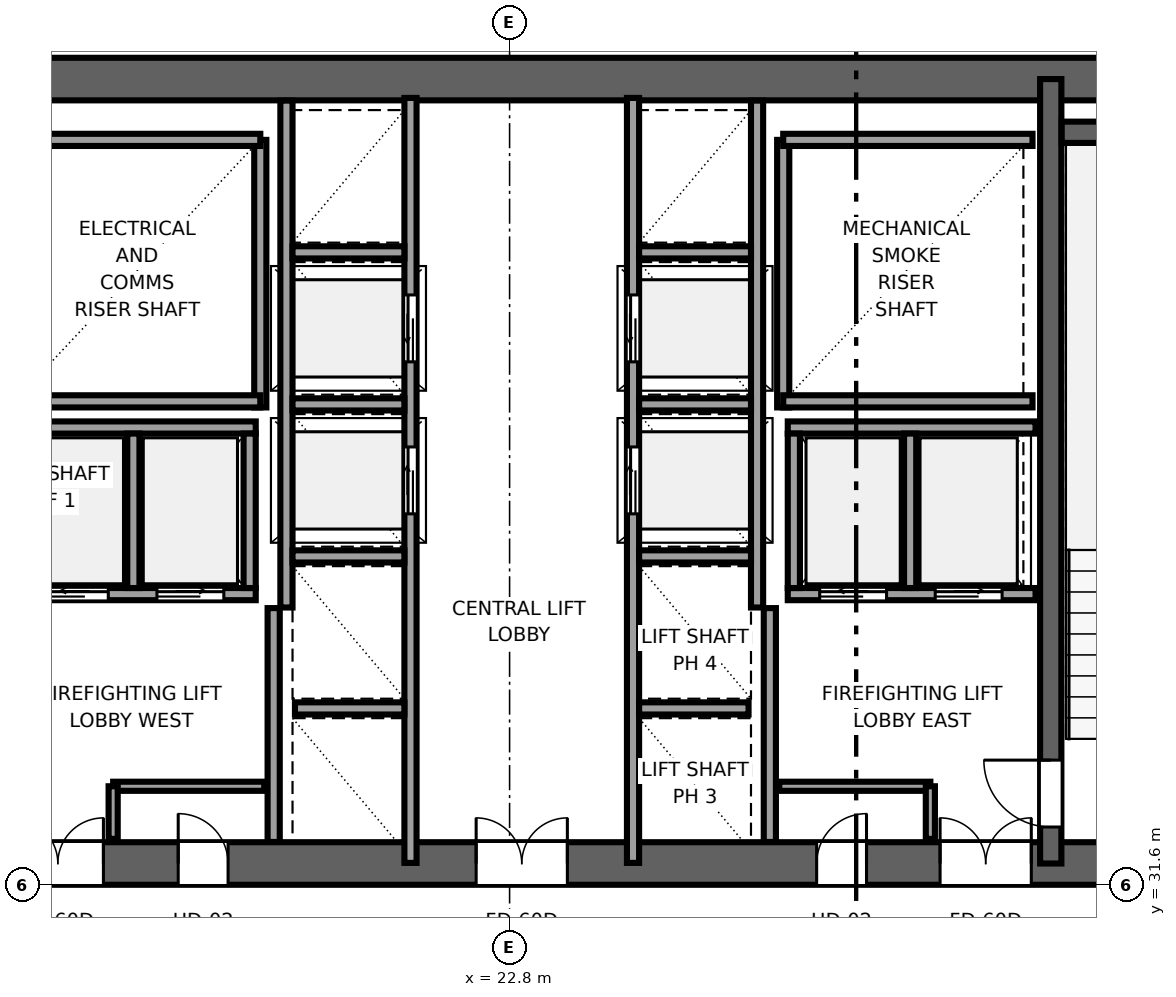
"""IFC4 building model, lengths in metres.
Left out: names, types, materials, properties, quantities, classifications, styles, units other than length and angle.
Written with IfcOpenShell. Run it as: python <this file> out.ifc"""

import sys

from ifc_helpers import new_model, si_unit, direction, frame, frame_2d, origin, place, context, subcontext, project, spatial, rectangle, extrude, source, transform, mapped, element, fill, save


model = new_model("IFC4")
c1 = context("Model", 3, precision=1e-05, world=origin(), true_north=direction((0.0, 1.0)))
c2 = subcontext(c1, "Body", "Model", "MODEL_VIEW")
j1 = project(units=[si_unit("LENGTHUNIT", "METRE"), si_unit("PLANEANGLEUNIT", "RADIAN")], contexts=[c1])
p1 = place(None, origin())
s1 = spatial("IfcSite", under=j1, at=p1, CompositionType="ELEMENT")
p2 = place(p1, origin())
s2 = spatial("IfcBuilding", under=s1, at=p2, CompositionType="ELEMENT")
p3 = place(p2, frame((0.0, 0.0, 157.7)))
s3 = spatial("IfcBuildingStorey", under=s2, at=p3, CompositionType="ELEMENT", Elevation=157.7)
p4 = place(p3, frame((9.8, 31.95, 0.0), z_axis=(0.0, 0.0, 1.0), x_axis=(1.0, 0.0, 0.0)))
e1 = element("IfcWall", 1, at=p4, inside=s3, PredefinedType="SHEAR", context=c2, shape_type="SweptSolid", body=[
    extrude(rectangle(XDim=26.4, YDim=0.7, at=frame_2d((13.2, 0.0))), origin(), (0.0, 0.0, 1.0), 3.55),
])
p5 = place(p4, frame((6.32, 0.0, 0.0), z_axis=(0.0, 0.0, 1.0), x_axis=(-1.0, 0.0, 0.0)))
e2 = element("IfcOpeningElement", 2, at=p5, cuts=e1, PredefinedType="OPENING", context=c2, shape_type="SweptSolid", body=[
    extrude(rectangle(XDim=1.5, YDim=2.04, at=frame_2d((0.75, 1.02))), frame((0.0, 0.36, 0.0), z_axis=(0.0, -1.0, 0.0), x_axis=(1.0, 0.0, 0.0)), (0.0, 0.0, 1.0), 0.72),
])
p6 = place(p4, frame((13.95, 0.0, 0.0), z_axis=(0.0, 0.0, 1.0), x_axis=(-1.0, 0.0, 0.0)))
e3 = element("IfcOpeningElement", 3, at=p6, cuts=e1, PredefinedType="OPENING", context=c2, shape_type="SweptSolid", body=[
    extrude(rectangle(XDim=1.5, YDim=2.04, at=frame_2d((0.75, 1.02))), frame((0.0, 0.36, 0.0), z_axis=(0.0, -1.0, 0.0), x_axis=(1.0, 0.0, 0.0)), (0.0, 0.0, 1.0), 0.72),
])
p7 = place(p4, frame((21.58, 0.0, 0.0), z_axis=(0.0, 0.0, 1.0), x_axis=(-1.0, 0.0, 0.0)))
e4 = element("IfcOpeningElement", 4, at=p7, cuts=e1, PredefinedType="OPENING", context=c2, shape_type="SweptSolid", body=[
    extrude(rectangle(XDim=1.5, YDim=2.04, at=frame_2d((0.75, 1.02))), frame((0.0, 0.36, 0.0), z_axis=(0.0, -1.0, 0.0), x_axis=(1.0, 0.0, 0.0)), (0.0, 0.0, 1.0), 0.72),
])
p8 = place(p4, frame((8.37, 0.0, 0.0), z_axis=(0.0, 0.0, 1.0), x_axis=(-1.0, 0.0, 0.0)))
e5 = element("IfcOpeningElement", 5, at=p8, cuts=e1, PredefinedType="OPENING", context=c2, shape_type="SweptSolid", body=[
    extrude(rectangle(XDim=0.82, YDim=2.01, at=frame_2d((0.41, 1.005))), frame((0.0, 0.36, 0.0), z_axis=(0.0, -1.0, 0.0), x_axis=(1.0, 0.0, 0.0)), (0.0, 0.0, 1.0), 0.72),
])
p9 = place(p4, frame((18.87, 0.0, 0.0), z_axis=(0.0, 0.0, 1.0), x_axis=(-1.0, 0.0, 0.0)))
e6 = element("IfcOpeningElement", 6, at=p9, cuts=e1, PredefinedType="OPENING", context=c2, shape_type="SweptSolid", body=[
    extrude(rectangle(XDim=0.82, YDim=2.01, at=frame_2d((0.41, 1.005))), frame((0.0, 0.36, 0.0), z_axis=(0.0, -1.0, 0.0), x_axis=(1.0, 0.0, 0.0)), (0.0, 0.0, 1.0), 0.72),
])
p10 = place(p3, frame((9.8, 44.85, 0.0), z_axis=(0.0, 0.0, 1.0), x_axis=(1.0, 0.0, 0.0)))
e7 = element("IfcWall", 7, at=p10, inside=s3, PredefinedType="SHEAR", context=c2, shape_type="SweptSolid", body=[
    extrude(rectangle(XDim=26.4, YDim=0.7, at=frame_2d((13.2, 0.0))), origin(), (0.0, 0.0, 1.0), 3.55),
])
p11 = place(p3, frame((31.7, 31.95, 0.0), z_axis=(0.0, 0.0, 1.0), x_axis=(0.0, 1.0, 0.0)))
e8 = element("IfcWall", 8, at=p11, inside=s3, PredefinedType="SHEAR", context=c2, shape_type="SweptSolid", body=[
    extrude(rectangle(XDim=12.9, YDim=0.35, at=frame_2d((6.45, 0.0))), origin(), (0.0, 0.0, 1.0), 3.55),
])
p12 = place(p11, frame((1.7, 0.0, 0.0), z_axis=(0.0, 0.0, 1.0), x_axis=(-1.0, 0.0, 0.0)))
e9 = element("IfcOpeningElement", 9, at=p12, cuts=e8, PredefinedType="OPENING", context=c2, shape_type="SweptSolid", body=[
    extrude(rectangle(XDim=1.1, YDim=2.12, at=frame_2d((0.55, 1.06))), frame((0.0, 0.185, 0.0), z_axis=(0.0, -1.0, 0.0), x_axis=(1.0, 0.0, 0.0)), (0.0, 0.0, 1.0), 0.37),
])
p13 = place(p3, frame((31.88, 43.975, 0.0), z_axis=(0.0, 0.0, 1.0), x_axis=(1.0, 0.0, 0.0)))
e10 = element("IfcWall", 10, at=p13, inside=s3, PredefinedType="SHEAR", context=c2, shape_type="SweptSolid", body=[
    extrude(rectangle(XDim=3.6, YDim=0.35, at=frame_2d((1.8, 0.0))), origin(), (0.0, 0.0, 1.0), 3.55),
])
p14 = place(p3, frame((18.7, 39.45, 0.0), z_axis=(0.0, 0.0, 1.0), x_axis=(0.0, 1.0, 0.0)))
e11 = element("IfcWall", 11, at=p14, inside=s3, PredefinedType="SOLIDWALL", context=c2, shape_type="SweptSolid", body=[
    extrude(rectangle(XDim=4.4, YDim=0.2, at=frame_2d((2.2, 0.0))), origin(), (0.0, 0.0, 1.0), 3.37),
])
for number, where, z_axis, x_axis in (
    (12, (14.6, 39.55, 0.0), (0.0, 0.0, 1.0), (1.0, 0.0, 0.0)),
    (13, (14.6, 43.85, 0.0), (0.0, 0.0, 1.0), (1.0, 0.0, 0.0)),
):
    element("IfcWall", number, at=place(p3, frame(where, z_axis=z_axis, x_axis=x_axis)), inside=s3, PredefinedType="SOLIDWALL", context=c2, shape_type="SweptSolid", body=[
        extrude(rectangle(XDim=4.1, YDim=0.2, at=frame_2d((2.05, 0.0))), origin(), (0.0, 0.0, 1.0), 3.37),
    ])
p15 = place(p3, frame((27.3, 39.45, 0.0), z_axis=(0.0, 0.0, 1.0), x_axis=(0.0, 1.0, 0.0)))
e14 = element("IfcWall", 14, at=p15, inside=s3, PredefinedType="SOLIDWALL", context=c2, shape_type="SweptSolid", body=[
    extrude(rectangle(XDim=4.4, YDim=0.2, at=frame_2d((2.2, 0.0))), origin(), (0.0, 0.0, 1.0), 3.37),
])
for number, where, z_axis, x_axis in (
    (15, (27.3, 39.55, 0.0), (0.0, 0.0, 1.0), (1.0, 0.0, 0.0)),
    (16, (27.3, 43.85, 0.0), (0.0, 0.0, 1.0), (1.0, 0.0, 0.0)),
):
    element("IfcWall", number, at=place(p3, frame(where, z_axis=z_axis, x_axis=x_axis)), inside=s3, PredefinedType="SOLIDWALL", context=c2, shape_type="SweptSolid", body=[
        extrude(rectangle(XDim=4.1, YDim=0.2, at=frame_2d((2.05, 0.0))), origin(), (0.0, 0.0, 1.0), 3.37),
    ])
for number, where, z_axis, x_axis in (
    (17, (18.92, 32.304, 0.0), (0.0, 0.0, 1.0), (0.0, 1.0, 0.0)),
    (18, (27.08, 32.304, 0.0), (0.0, 0.0, 1.0), (0.0, 1.0, 0.0)),
):
    element("IfcWall", number, at=place(p3, frame(where, z_axis=z_axis, x_axis=x_axis)), inside=s3, PredefinedType="SOLIDWALL", context=c2, shape_type="SweptSolid", body=[
        extrude(rectangle(XDim=3.846, YDim=0.2, at=frame_2d((1.923, 0.0))), origin(), (0.0, 0.0, 1.0), 3.37),
    ])
p16 = place(p3, frame((21.17, 31.96, 0.0), z_axis=(0.0, 0.0, 1.0), x_axis=(0.0, 1.0, 0.0)))
e19 = element("IfcWall", 19, at=p16, inside=s3, PredefinedType="SOLIDWALL", context=c2, shape_type="SweptSolid", body=[
    extrude(rectangle(XDim=12.58, YDim=0.2, at=frame_2d((6.29, 0.0))), origin(), (0.0, 0.0, 1.0), 3.37),
])
p17 = place(p16, frame((5.74, 0.0, 0.0)))
e20 = element("IfcOpeningElement", 20, at=p17, cuts=e19, PredefinedType="OPENING", context=c2, shape_type="SweptSolid", body=[
    extrude(rectangle(XDim=1.1, YDim=2.12, at=frame_2d((0.55, 1.06))), frame((0.0, 0.11, 0.0), z_axis=(0.0, -1.0, 0.0), x_axis=(1.0, 0.0, 0.0)), (0.0, 0.0, 1.0), 0.22),
])
p18 = place(p16, frame((8.24, 0.0, 0.0)))
e21 = element("IfcOpeningElement", 21, at=p18, cuts=e19, PredefinedType="OPENING", context=c2, shape_type="SweptSolid", body=[
    extrude(rectangle(XDim=1.1, YDim=2.12, at=frame_2d((0.55, 1.06))), frame((0.0, 0.11, 0.0), z_axis=(0.0, -1.0, 0.0), x_axis=(1.0, 0.0, 0.0)), (0.0, 0.0, 1.0), 0.22),
])
p19 = place(p3, frame((19.13, 36.16, 0.0), z_axis=(0.0, 0.0, 1.0), x_axis=(0.0, 1.0, 0.0)))
e22 = element("IfcWall", 22, at=p19, inside=s3, PredefinedType="SOLIDWALL", context=c2, shape_type="SweptSolid", body=[
    extrude(rectangle(XDim=8.336, YDim=0.2, at=frame_2d((4.168, 0.0))), origin(), (0.0, 0.0, 1.0), 3.37),
])
p20 = place(p3, frame((19.27, 34.5, 0.0), z_axis=(0.0, 0.0, 1.0), x_axis=(1.0, 0.0, 0.0)))
e23 = element("IfcWall", 23, at=p20, inside=s3, PredefinedType="SOLIDWALL", context=c2, shape_type="SweptSolid", body=[
    extrude(rectangle(XDim=1.8, YDim=0.2, at=frame_2d((0.9, 0.0))), origin(), (0.0, 0.0, 1.0), 3.37),
])
for number, where, z_axis, x_axis in (
    (24, (19.23, 37.0, 0.0), (0.0, 0.0, 1.0), (1.0, 0.0, 0.0)),
    (25, (19.23, 39.5, 0.0), (0.0, 0.0, 1.0), (1.0, 0.0, 0.0)),
    (26, (19.23, 42.0, 0.0), (0.0, 0.0, 1.0), (1.0, 0.0, 0.0)),
):
    element("IfcWall", number, at=place(p3, frame(where, z_axis=z_axis, x_axis=x_axis)), inside=s3, PredefinedType="SOLIDWALL", context=c2, shape_type="SweptSolid", body=[
        extrude(rectangle(XDim=1.84, YDim=0.2, at=frame_2d((0.92, 0.0))), origin(), (0.0, 0.0, 1.0), 3.37),
    ])
p21 = place(p3, frame((27.375, 36.38, 0.0), z_axis=(0.0, 0.0, 1.0), x_axis=(1.0, 0.0, 0.0)))
e27 = element("IfcWall", 27, at=p21, inside=s3, PredefinedType="SOLIDWALL", context=c2, shape_type="SweptSolid", body=[
    extrude(rectangle(XDim=4.075, YDim=0.2, at=frame_2d((2.038, 0.0))), origin(), (0.0, 0.0, 1.0), 3.37),
])
p22 = place(p21, frame((0.525, 0.0, 0.0)))
e28 = element("IfcOpeningElement", 28, at=p22, cuts=e27, PredefinedType="OPENING", context=c2, shape_type="SweptSolid", body=[
    extrude(rectangle(XDim=1.1, YDim=2.12, at=frame_2d((0.55, 1.06))), frame((0.0, 0.11, 0.0), z_axis=(0.0, -1.0, 0.0), x_axis=(1.0, 0.0, 0.0)), (0.0, 0.0, 1.0), 0.22),
])
p23 = place(p21, frame((2.425, 0.0, 0.0)))
e29 = element("IfcOpeningElement", 29, at=p23, cuts=e27, PredefinedType="OPENING", context=c2, shape_type="SweptSolid", body=[
    extrude(rectangle(XDim=1.1, YDim=2.12, at=frame_2d((0.55, 1.06))), frame((0.0, 0.11, 0.0), z_axis=(0.0, -1.0, 0.0), x_axis=(1.0, 0.0, 0.0)), (0.0, 0.0, 1.0), 0.22),
])
p24 = place(p3, frame((27.375, 39.12, 0.0), z_axis=(0.0, 0.0, 1.0), x_axis=(1.0, 0.0, 0.0)))
e30 = element("IfcWall", 30, at=p24, inside=s3, PredefinedType="SOLIDWALL", context=c2, shape_type="SweptSolid", body=[
    extrude(rectangle(XDim=4.075, YDim=0.2, at=frame_2d((2.038, 0.0))), origin(), (0.0, 0.0, 1.0), 3.37),
])
for number, where, z_axis, x_axis in (
    (31, (27.475, 36.48, 0.0), (0.0, 0.0, 1.0), (0.0, 1.0, 0.0)),
    (32, (29.387, 36.48, 0.0), (0.0, 0.0, 1.0), (0.0, 1.0, 0.0)),
):
    element("IfcWall", number, at=place(p3, frame(where, z_axis=z_axis, x_axis=x_axis)), inside=s3, PredefinedType="SOLIDWALL", context=c2, shape_type="SweptSolid", body=[
        extrude(rectangle(XDim=2.54, YDim=0.2, at=frame_2d((1.27, 0.0))), origin(), (0.0, 0.0, 1.0), 3.37),
    ])
p25 = place(p3, frame((14.55, 36.38, 0.0), z_axis=(0.0, 0.0, 1.0), x_axis=(1.0, 0.0, 0.0)))
e33 = element("IfcWall", 33, at=p25, inside=s3, PredefinedType="SOLIDWALL", context=c2, shape_type="SweptSolid", body=[
    extrude(rectangle(XDim=4.075, YDim=0.2, at=frame_2d((2.038, 0.0))), origin(), (0.0, 0.0, 1.0), 3.37),
])
p26 = place(p25, frame((0.55, 0.0, 0.0)))
e34 = element("IfcOpeningElement", 34, at=p26, cuts=e33, PredefinedType="OPENING", context=c2, shape_type="SweptSolid", body=[
    extrude(rectangle(XDim=1.1, YDim=2.12, at=frame_2d((0.55, 1.06))), frame((0.0, 0.11, 0.0), z_axis=(0.0, -1.0, 0.0), x_axis=(1.0, 0.0, 0.0)), (0.0, 0.0, 1.0), 0.22),
])
p27 = place(p25, frame((2.45, 0.0, 0.0)))
e35 = element("IfcOpeningElement", 35, at=p27, cuts=e33, PredefinedType="OPENING", context=c2, shape_type="SweptSolid", body=[
    extrude(rectangle(XDim=1.1, YDim=2.12, at=frame_2d((0.55, 1.06))), frame((0.0, 0.11, 0.0), z_axis=(0.0, -1.0, 0.0), x_axis=(1.0, 0.0, 0.0)), (0.0, 0.0, 1.0), 0.22),
])
p28 = place(p3, frame((14.55, 39.12, 0.0), z_axis=(0.0, 0.0, 1.0), x_axis=(1.0, 0.0, 0.0)))
e36 = element("IfcWall", 36, at=p28, inside=s3, PredefinedType="SOLIDWALL", context=c2, shape_type="SweptSolid", body=[
    extrude(rectangle(XDim=4.075, YDim=0.2, at=frame_2d((2.038, 0.0))), origin(), (0.0, 0.0, 1.0), 3.37),
])
for number, where, z_axis, x_axis in (
    (37, (18.525, 36.48, 0.0), (0.0, 0.0, 1.0), (0.0, 1.0, 0.0)),
    (38, (16.613, 36.48, 0.0), (0.0, 0.0, 1.0), (0.0, 1.0, 0.0)),
):
    element("IfcWall", number, at=place(p3, frame(where, z_axis=z_axis, x_axis=x_axis)), inside=s3, PredefinedType="SOLIDWALL", context=c2, shape_type="SweptSolid", body=[
        extrude(rectangle(XDim=2.54, YDim=0.2, at=frame_2d((1.27, 0.0))), origin(), (0.0, 0.0, 1.0), 3.37),
    ])
p29 = place(p3, frame((24.83, 31.96, 0.0), z_axis=(0.0, 0.0, 1.0), x_axis=(0.0, 1.0, 0.0)))
e39 = element("IfcWall", 39, at=p29, inside=s3, PredefinedType="SOLIDWALL", context=c2, shape_type="SweptSolid", body=[
    extrude(rectangle(XDim=12.58, YDim=0.2, at=frame_2d((6.29, 0.0))), origin(), (0.0, 0.0, 1.0), 3.37),
])
p30 = place(p29, frame((5.74, 0.0, 0.0)))
e40 = element("IfcOpeningElement", 40, at=p30, cuts=e39, PredefinedType="OPENING", context=c2, shape_type="SweptSolid", body=[
    extrude(rectangle(XDim=1.1, YDim=2.12, at=frame_2d((0.55, 1.06))), frame((0.0, 0.11, 0.0), z_axis=(0.0, -1.0, 0.0), x_axis=(1.0, 0.0, 0.0)), (0.0, 0.0, 1.0), 0.22),
])
p31 = place(p29, frame((8.24, 0.0, 0.0)))
e41 = element("IfcOpeningElement", 41, at=p31, cuts=e39, PredefinedType="OPENING", context=c2, shape_type="SweptSolid", body=[
    extrude(rectangle(XDim=1.1, YDim=2.12, at=frame_2d((0.55, 1.06))), frame((0.0, 0.11, 0.0), z_axis=(0.0, -1.0, 0.0), x_axis=(1.0, 0.0, 0.0)), (0.0, 0.0, 1.0), 0.22),
])
p32 = place(p3, frame((26.87, 36.16, 0.0), z_axis=(0.0, 0.0, 1.0), x_axis=(0.0, 1.0, 0.0)))
e42 = element("IfcWall", 42, at=p32, inside=s3, PredefinedType="SOLIDWALL", context=c2, shape_type="SweptSolid", body=[
    extrude(rectangle(XDim=8.336, YDim=0.2, at=frame_2d((4.168, 0.0))), origin(), (0.0, 0.0, 1.0), 3.37),
])
p33 = place(p3, frame((24.93, 34.5, 0.0), z_axis=(0.0, 0.0, 1.0), x_axis=(1.0, 0.0, 0.0)))
e43 = element("IfcWall", 43, at=p33, inside=s3, PredefinedType="SOLIDWALL", context=c2, shape_type="SweptSolid", body=[
    extrude(rectangle(XDim=1.8, YDim=0.2, at=frame_2d((0.9, 0.0))), origin(), (0.0, 0.0, 1.0), 3.37),
])
for number, where, z_axis, x_axis in (
    (44, (24.93, 37.0, 0.0), (0.0, 0.0, 1.0), (1.0, 0.0, 0.0)),
    (45, (24.93, 39.5, 0.0), (0.0, 0.0, 1.0), (1.0, 0.0, 0.0)),
    (46, (24.93, 42.0, 0.0), (0.0, 0.0, 1.0), (1.0, 0.0, 0.0)),
):
    element("IfcWall", number, at=place(p3, frame(where, z_axis=z_axis, x_axis=x_axis)), inside=s3, PredefinedType="SOLIDWALL", context=c2, shape_type="SweptSolid", body=[
        extrude(rectangle(XDim=1.84, YDim=0.2, at=frame_2d((0.92, 0.0))), origin(), (0.0, 0.0, 1.0), 3.37),
    ])
p34 = place(p3, frame((16.28, 33.22, 0.0), z_axis=(0.0, 0.0, 1.0), x_axis=(1.0, 0.0, 0.0)))
e47 = element("IfcWall", 47, at=p34, inside=s3, PredefinedType="PARTITIONING", context=c2, shape_type="SweptSolid", body=[
    extrude(rectangle(XDim=2.485, YDim=0.15, at=frame_2d((1.242, 0.0))), origin(), (0.0, 0.0, 1.0), 3.37),
])
p35 = place(p3, frame((16.28, 32.355, 0.0), z_axis=(0.0, 0.0, 1.0), x_axis=(0.0, 1.0, 0.0)))
e48 = element("IfcWall", 48, at=p35, inside=s3, PredefinedType="PARTITIONING", context=c2, shape_type="SweptSolid", body=[
    extrude(rectangle(XDim=0.865, YDim=0.15, at=frame_2d((0.433, 0.0))), origin(), (0.0, 0.0, 1.0), 3.37),
])
p36 = place(p3, frame((27.235, 33.22, 0.0), z_axis=(0.0, 0.0, 1.0), x_axis=(1.0, 0.0, 0.0)))
e49 = element("IfcWall", 49, at=p36, inside=s3, PredefinedType="PARTITIONING", context=c2, shape_type="SweptSolid", body=[
    extrude(rectangle(XDim=2.485, YDim=0.15, at=frame_2d((1.242, 0.0))), origin(), (0.0, 0.0, 1.0), 3.37),
])
p37 = place(p3, frame((29.72, 32.355, 0.0), z_axis=(0.0, 0.0, 1.0), x_axis=(0.0, 1.0, 0.0)))
e50 = element("IfcWall", 50, at=p37, inside=s3, PredefinedType="PARTITIONING", context=c2, shape_type="SweptSolid", body=[
    extrude(rectangle(XDim=0.865, YDim=0.15, at=frame_2d((0.433, 0.0))), origin(), (0.0, 0.0, 1.0), 3.37),
])
m1 = source(origin(), c2, "Body", "SweptSolid", [
    extrude(rectangle(XDim=1.1, YDim=2.12, at=frame_2d((0.55, 1.06))), frame((0.0, 0.025, 0.0), z_axis=(0.0, -1.0, 0.0), x_axis=(1.0, 0.0, 0.0)), (0.0, 0.0, 1.0), 0.05),
])
p38 = place(p12, origin())
e51 = element("IfcDoor", 51, at=p38, inside=s3, OperationType="SINGLE_SWING_RIGHT", PredefinedType="DOOR", context=c2, shape_type="MappedRepresentation", body=[
    mapped(m1, transform((0.0, 0.0, 0.0), x_axis=(1.0, 0.0, 0.0), y_axis=(0.0, 1.0, 0.0), z_axis=(0.0, 0.0, 1.0), scale=1.0)),
])
fill(e9, e51)
m2 = source(origin(), c2, "Body", "SweptSolid", [
    extrude(rectangle(XDim=1.5, YDim=2.04, at=frame_2d((0.75, 1.02))), frame((0.0, 0.025, 0.0), z_axis=(0.0, -1.0, 0.0), x_axis=(1.0, 0.0, 0.0)), (0.0, 0.0, 1.0), 0.05),
])
p39 = place(p5, origin())
e52 = element("IfcDoor", 52, at=p39, inside=s3, OperationType="DOUBLE_DOOR_SINGLE_SWING", PredefinedType="DOOR", context=c2, shape_type="MappedRepresentation", body=[
    mapped(m2, transform((0.0, 0.0, 0.0), x_axis=(1.0, 0.0, 0.0), y_axis=(0.0, 1.0, 0.0), z_axis=(0.0, 0.0, 1.0), scale=1.0)),
])
fill(e2, e52)
p40 = place(p6, origin())
e53 = element("IfcDoor", 53, at=p40, inside=s3, OperationType="DOUBLE_DOOR_SINGLE_SWING", PredefinedType="DOOR", context=c2, shape_type="MappedRepresentation", body=[
    mapped(m2, transform((0.0, 0.0, 0.0), x_axis=(1.0, 0.0, 0.0), y_axis=(0.0, 1.0, 0.0), z_axis=(0.0, 0.0, 1.0), scale=1.0)),
])
fill(e3, e53)
p41 = place(p7, origin())
e54 = element("IfcDoor", 54, at=p41, inside=s3, OperationType="DOUBLE_DOOR_SINGLE_SWING", PredefinedType="DOOR", context=c2, shape_type="MappedRepresentation", body=[
    mapped(m2, transform((0.0, 0.0, 0.0), x_axis=(1.0, 0.0, 0.0), y_axis=(0.0, 1.0, 0.0), z_axis=(0.0, 0.0, 1.0), scale=1.0)),
])
fill(e4, e54)
m3 = source(origin(), c2, "Body", "SweptSolid", [
    extrude(rectangle(XDim=0.82, YDim=2.01, at=frame_2d((0.41, 1.005))), frame((0.0, 0.025, 0.0), z_axis=(0.0, -1.0, 0.0), x_axis=(1.0, 0.0, 0.0)), (0.0, 0.0, 1.0), 0.05),
])
p42 = place(p8, origin())
e55 = element("IfcDoor", 55, at=p42, inside=s3, OperationType="SINGLE_SWING_LEFT", PredefinedType="DOOR", context=c2, shape_type="MappedRepresentation", body=[
    mapped(m3, transform((0.0, 0.0, 0.0), x_axis=(1.0, 0.0, 0.0), y_axis=(0.0, 1.0, 0.0), z_axis=(0.0, 0.0, 1.0), scale=1.0)),
])
fill(e5, e55)
p43 = place(p9, origin())
e56 = element("IfcDoor", 56, at=p43, inside=s3, OperationType="SINGLE_SWING_RIGHT", PredefinedType="DOOR", context=c2, shape_type="MappedRepresentation", body=[
    mapped(m3, transform((0.0, 0.0, 0.0), x_axis=(1.0, 0.0, 0.0), y_axis=(0.0, 1.0, 0.0), z_axis=(0.0, 0.0, 1.0), scale=1.0)),
])
fill(e6, e56)
m4 = source(origin(), c2, "Body", "SweptSolid", [
    extrude(rectangle(XDim=1.1, YDim=2.12, at=frame_2d((0.55, 1.06))), frame((0.0, 0.025, 0.0), z_axis=(0.0, -1.0, 0.0), x_axis=(1.0, 0.0, 0.0)), (0.0, 0.0, 1.0), 0.05),
])
p44 = place(p17, origin())
e57 = element("IfcDoor", 57, at=p44, inside=s3, OperationType="SLIDING_TO_RIGHT", PredefinedType="DOOR", context=c2, shape_type="MappedRepresentation", body=[
    mapped(m4, transform((0.0, 0.0, 0.0), x_axis=(1.0, 0.0, 0.0), y_axis=(0.0, 1.0, 0.0), z_axis=(0.0, 0.0, 1.0), scale=1.0)),
])
fill(e20, e57)
p45 = place(p18, origin())
e58 = element("IfcDoor", 58, at=p45, inside=s3, OperationType="SLIDING_TO_LEFT", PredefinedType="DOOR", context=c2, shape_type="MappedRepresentation", body=[
    mapped(m4, transform((0.0, 0.0, 0.0), x_axis=(1.0, 0.0, 0.0), y_axis=(0.0, 1.0, 0.0), z_axis=(0.0, 0.0, 1.0), scale=1.0)),
])
fill(e21, e58)
p46 = place(p22, origin())
e59 = element("IfcDoor", 59, at=p46, inside=s3, OperationType="SLIDING_TO_LEFT", PredefinedType="DOOR", context=c2, shape_type="MappedRepresentation", body=[
    mapped(m4, transform((0.0, 0.0, 0.0), x_axis=(1.0, 0.0, 0.0), y_axis=(0.0, 1.0, 0.0), z_axis=(0.0, 0.0, 1.0), scale=1.0)),
])
fill(e28, e59)
p47 = place(p23, origin())
e60 = element("IfcDoor", 60, at=p47, inside=s3, OperationType="SLIDING_TO_RIGHT", PredefinedType="DOOR", context=c2, shape_type="MappedRepresentation", body=[
    mapped(m4, transform((0.0, 0.0, 0.0), x_axis=(1.0, 0.0, 0.0), y_axis=(0.0, 1.0, 0.0), z_axis=(0.0, 0.0, 1.0), scale=1.0)),
])
fill(e29, e60)
p48 = place(p26, origin())
e61 = element("IfcDoor", 61, at=p48, inside=s3, OperationType="SLIDING_TO_LEFT", PredefinedType="DOOR", context=c2, shape_type="MappedRepresentation", body=[
    mapped(m4, transform((0.0, 0.0, 0.0), x_axis=(1.0, 0.0, 0.0), y_axis=(0.0, 1.0, 0.0), z_axis=(0.0, 0.0, 1.0), scale=1.0)),
])
fill(e34, e61)
p49 = place(p27, origin())
e62 = element("IfcDoor", 62, at=p49, inside=s3, OperationType="SLIDING_TO_RIGHT", PredefinedType="DOOR", context=c2, shape_type="MappedRepresentation", body=[
    mapped(m4, transform((0.0, 0.0, 0.0), x_axis=(1.0, 0.0, 0.0), y_axis=(0.0, 1.0, 0.0), z_axis=(0.0, 0.0, 1.0), scale=1.0)),
])
fill(e35, e62)
p50 = place(p30, origin())
e63 = element("IfcDoor", 63, at=p50, inside=s3, OperationType="SLIDING_TO_RIGHT", PredefinedType="DOOR", context=c2, shape_type="MappedRepresentation", body=[
    mapped(m4, transform((0.0, 0.0, 0.0), x_axis=(1.0, 0.0, 0.0), y_axis=(0.0, 1.0, 0.0), z_axis=(0.0, 0.0, 1.0), scale=1.0)),
])
fill(e40, e63)
p51 = place(p31, origin())
e64 = element("IfcDoor", 64, at=p51, inside=s3, OperationType="SLIDING_TO_LEFT", PredefinedType="DOOR", context=c2, shape_type="MappedRepresentation", body=[
    mapped(m4, transform((0.0, 0.0, 0.0), x_axis=(1.0, 0.0, 0.0), y_axis=(0.0, 1.0, 0.0), z_axis=(0.0, 0.0, 1.0), scale=1.0)),
])
fill(e41, e64)
save(model, sys.argv[1])
